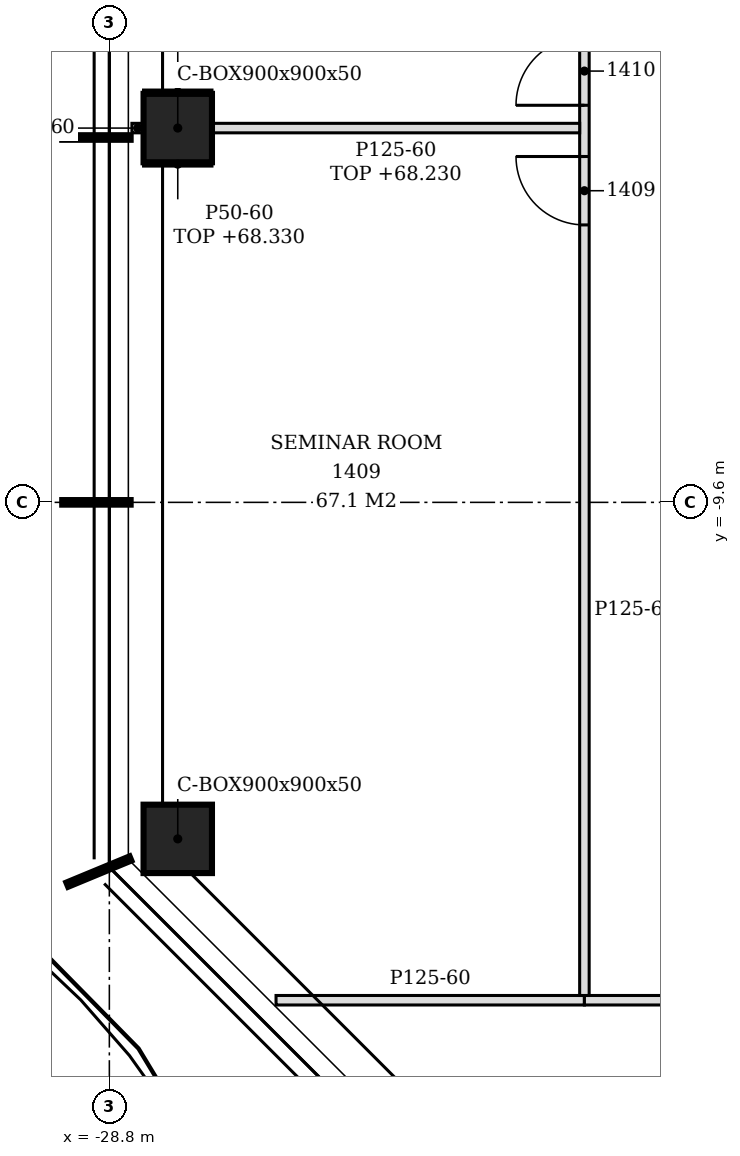
"""IFC4 building model, lengths in metres.
Left out: names, types, materials, properties, quantities, classifications, styles, units other than length and angle.
Written with IfcOpenShell. Run it as: python <this file> out.ifc"""

import sys

from ifc_helpers import new_model, si_unit, direction, frame, frame_2d, origin, origin_2d, place, context, subcontext, project, spatial, polyline, rectangle, hollow_rectangle, outline, extrude, element, fill, save


model = new_model("IFC4")
c1 = context("Model", 3, precision=1e-05, world=origin(), true_north=direction((0.0, 1.0)))
c2 = subcontext(c1, "Body", "Model", "MODEL_VIEW")
j1 = project(units=[si_unit("LENGTHUNIT", "METRE"), si_unit("PLANEANGLEUNIT", "RADIAN")], contexts=[c1])
p1 = place(None, origin())
s1 = spatial("IfcSite", under=j1, at=p1, CompositionType="ELEMENT")
p2 = place(p1, origin())
s2 = spatial("IfcBuilding", under=s1, at=p2, CompositionType="ELEMENT")
p3 = place(p2, frame((0.0, 0.0, 65.4)))
s3 = spatial("IfcBuildingStorey", under=s2, at=p3, CompositionType="ELEMENT", Elevation=65.4)
for number, where, z_axis, x_axis in (
    (1, (-27.9, -4.676, -0.15), (0.0, 0.0, 1.0), (1.0, 0.0, 0.0)),
    (2, (-27.9, -14.027, -0.15), (0.0, 0.0, 1.0), (1.0, 0.0, 0.0)),
):
    element("IfcColumn", number, at=place(p3, frame(where, z_axis=z_axis, x_axis=x_axis)), inside=s3, PredefinedType="COLUMN", context=c2, shape_type="SweptSolid", body=[
        extrude(hollow_rectangle(XDim=0.9, YDim=0.9, WallThickness=0.05, at=origin_2d()), origin(), (0.0, 0.0, 1.0), 3.6),
    ])
p4 = place(p3, frame((-26.607, -16.15, 0.0), z_axis=(0.0, 0.0, 1.0), x_axis=(1.0, 0.0, 0.0)))
e3 = element("IfcWall", 3, at=p4, inside=s3, PredefinedType="PARTITIONING", context=c2, shape_type="SweptSolid", body=[
    extrude(outline(polyline([(0.0, 0.0), (4.057, 0.0), (4.057, 3.45), (1.104, 3.45), (1.102, 2.93), (0.555, 2.93), (0.553, 3.45), (0.0, 3.45), (0.0, 0.0)])), frame((0.0, 0.062, 0.0), z_axis=(0.0, -1.0, 0.0), x_axis=(1.0, 0.0, 0.0)), (0.0, 0.0, 1.0), 0.125),
])
p5 = place(p3, frame((-22.55, -16.15, 0.0), z_axis=(0.0, 0.0, 1.0), x_axis=(1.0, 0.0, 0.0)))
e4 = element("IfcWall", 4, at=p5, inside=s3, PredefinedType="PARTITIONING", context=c2, shape_type="SweptSolid", body=[
    extrude(outline(polyline([(0.0, 0.0), (41.688, 0.0), (41.688, 2.73), (41.6, 2.73), (41.598, 3.45), (29.9, 3.45), (29.898, 2.73), (29.6, 2.73), (29.598, 3.45), (17.9, 3.45), (17.898, 2.73), (17.6, 2.73), (17.598, 3.45), (8.3, 3.45), (8.298, 2.93), (8.0, 2.93), (7.998, 3.45), (0.0, 3.45), (0.0, 0.0)])), frame((0.0, 0.062, 0.0), z_axis=(0.0, -1.0, 0.0), x_axis=(1.0, 0.0, 0.0)), (0.0, 0.0, 1.0), 0.125),
])
p6 = place(p5, frame((6.95, 0.0, 0.0)))
e5 = element("IfcOpeningElement", 5, at=p6, cuts=e4, PredefinedType="OPENING", context=c2, shape_type="SweptSolid", body=[
    extrude(rectangle(XDim=0.9, YDim=2.1, at=frame_2d((0.45, 1.05))), frame((0.0, 0.073, 0.0), z_axis=(0.0, -1.0, 0.0), x_axis=(1.0, 0.0, 0.0)), (0.0, 0.0, 1.0), 0.145),
])
p7 = place(p5, frame((11.936, 0.0, 0.0)))
e6 = element("IfcOpeningElement", 6, at=p7, cuts=e4, PredefinedType="OPENING", context=c2, shape_type="SweptSolid", body=[
    extrude(rectangle(XDim=0.9, YDim=2.1, at=frame_2d((0.45, 1.05))), frame((0.0, 0.073, 0.0), z_axis=(0.0, -1.0, 0.0), x_axis=(1.0, 0.0, 0.0)), (0.0, 0.0, 1.0), 0.145),
])
p8 = place(p5, frame((16.55, 0.0, 0.0)))
e7 = element("IfcOpeningElement", 7, at=p8, cuts=e4, PredefinedType="OPENING", context=c2, shape_type="SweptSolid", body=[
    extrude(rectangle(XDim=0.9, YDim=2.1, at=frame_2d((0.45, 1.05))), frame((0.0, 0.073, 0.0), z_axis=(0.0, -1.0, 0.0), x_axis=(1.0, 0.0, 0.0)), (0.0, 0.0, 1.0), 0.145),
])
p9 = place(p5, frame((21.35, 0.0, 0.0)))
e8 = element("IfcOpeningElement", 8, at=p9, cuts=e4, PredefinedType="OPENING", context=c2, shape_type="SweptSolid", body=[
    extrude(rectangle(XDim=0.9, YDim=2.1, at=frame_2d((0.45, 1.05))), frame((0.0, 0.073, 0.0), z_axis=(0.0, -1.0, 0.0), x_axis=(1.0, 0.0, 0.0)), (0.0, 0.0, 1.0), 0.145),
])
p10 = place(p5, frame((26.15, 0.0, 0.0)))
e9 = element("IfcOpeningElement", 9, at=p10, cuts=e4, PredefinedType="OPENING", context=c2, shape_type="SweptSolid", body=[
    extrude(rectangle(XDim=0.9, YDim=2.1, at=frame_2d((0.45, 1.05))), frame((0.0, 0.073, 0.0), z_axis=(0.0, -1.0, 0.0), x_axis=(1.0, 0.0, 0.0)), (0.0, 0.0, 1.0), 0.145),
])
p11 = place(p5, frame((30.764, 0.0, 0.0)))
e10 = element("IfcOpeningElement", 10, at=p11, cuts=e4, PredefinedType="OPENING", context=c2, shape_type="SweptSolid", body=[
    extrude(rectangle(XDim=0.9, YDim=2.1, at=frame_2d((0.45, 1.05))), frame((0.0, 0.073, 0.0), z_axis=(0.0, -1.0, 0.0), x_axis=(1.0, 0.0, 0.0)), (0.0, 0.0, 1.0), 0.145),
])
p12 = place(p5, frame((32.35, 0.0, 0.0)))
e11 = element("IfcOpeningElement", 11, at=p12, cuts=e4, PredefinedType="OPENING", context=c2, shape_type="SweptSolid", body=[
    extrude(rectangle(XDim=0.9, YDim=2.1, at=frame_2d((0.45, 1.05))), frame((0.0, 0.073, 0.0), z_axis=(0.0, -1.0, 0.0), x_axis=(1.0, 0.0, 0.0)), (0.0, 0.0, 1.0), 0.145),
])
p13 = place(p5, frame((37.25, 0.0, 0.0)))
e12 = element("IfcOpeningElement", 12, at=p13, cuts=e4, PredefinedType="OPENING", context=c2, shape_type="SweptSolid", body=[
    extrude(rectangle(XDim=0.9, YDim=2.1, at=frame_2d((0.45, 1.05))), frame((0.0, 0.073, 0.0), z_axis=(0.0, -1.0, 0.0), x_axis=(1.0, 0.0, 0.0)), (0.0, 0.0, 1.0), 0.145),
])
p14 = place(p3, frame((-22.55, -16.087, 0.0), z_axis=(0.0, 0.0, 1.0), x_axis=(0.0, 1.0, 0.0)))
e13 = element("IfcWall", 13, at=p14, inside=s3, PredefinedType="PARTITIONING", context=c2, shape_type="SweptSolid", body=[
    extrude(outline(polyline([(0.0, 0.0), (36.276, 0.0), (36.276, 3.45), (36.022, 3.45), (36.02, 2.63), (34.907, 2.63), (34.905, 3.45), (30.597, 3.45), (30.595, 2.83), (30.377, 2.83), (30.375, 3.45), (25.798, 3.45), (25.795, 2.83), (25.577, 2.83), (25.575, 3.45), (20.998, 3.45), (20.996, 2.83), (20.778, 2.83), (20.775, 3.45), (16.198, 3.45), (16.196, 2.83), (15.978, 2.83), (15.976, 3.45), (11.397, 3.45), (11.396, 2.83), (11.177, 2.83), (11.176, 3.45), (6.597, 3.45), (6.595, 2.83), (6.377, 2.83), (6.375, 3.45), (1.798, 3.45), (1.795, 2.83), (1.577, 2.83), (1.575, 3.45), (0.0, 3.45), (0.0, 0.0)])), frame((0.0, 0.062, 0.0), z_axis=(0.0, -1.0, 0.0), x_axis=(1.0, 0.0, 0.0)), (0.0, 0.0, 1.0), 0.125),
])
p15 = place(p14, frame((10.137, 0.0, 0.0)))
e14 = element("IfcOpeningElement", 14, at=p15, cuts=e13, PredefinedType="OPENING", context=c2, shape_type="SweptSolid", body=[
    extrude(rectangle(XDim=0.9, YDim=2.1, at=frame_2d((0.45, 1.05))), frame((0.0, 0.073, 0.0), z_axis=(0.0, -1.0, 0.0), x_axis=(1.0, 0.0, 0.0)), (0.0, 0.0, 1.0), 0.145),
])
p16 = place(p14, frame((11.711, 0.0, 0.0)))
e15 = element("IfcOpeningElement", 15, at=p16, cuts=e13, PredefinedType="OPENING", context=c2, shape_type="SweptSolid", body=[
    extrude(rectangle(XDim=0.9, YDim=2.1, at=frame_2d((0.45, 1.05))), frame((0.0, 0.073, 0.0), z_axis=(0.0, -1.0, 0.0), x_axis=(1.0, 0.0, 0.0)), (0.0, 0.0, 1.0), 0.145),
])
p17 = place(p14, frame((17.288, 0.0, 0.0)))
e16 = element("IfcOpeningElement", 16, at=p17, cuts=e13, PredefinedType="OPENING", context=c2, shape_type="SweptSolid", body=[
    extrude(rectangle(XDim=0.9, YDim=2.1, at=frame_2d((0.45, 1.05))), frame((0.0, 0.073, 0.0), z_axis=(0.0, -1.0, 0.0), x_axis=(1.0, 0.0, 0.0)), (0.0, 0.0, 1.0), 0.145),
])
p18 = place(p14, frame((21.063, 0.0, 0.0)))
e17 = element("IfcOpeningElement", 17, at=p18, cuts=e13, PredefinedType="OPENING", context=c2, shape_type="SweptSolid", body=[
    extrude(rectangle(XDim=0.9, YDim=2.1, at=frame_2d((0.45, 1.05))), frame((0.0, 0.073, 0.0), z_axis=(0.0, -1.0, 0.0), x_axis=(1.0, 0.0, 0.0)), (0.0, 0.0, 1.0), 0.145),
])
p19 = place(p14, frame((27.188, 0.0, 0.0)))
e18 = element("IfcOpeningElement", 18, at=p19, cuts=e13, PredefinedType="OPENING", context=c2, shape_type="SweptSolid", body=[
    extrude(rectangle(XDim=0.9, YDim=2.1, at=frame_2d((0.45, 1.05))), frame((0.0, 0.073, 0.0), z_axis=(0.0, -1.0, 0.0), x_axis=(1.0, 0.0, 0.0)), (0.0, 0.0, 1.0), 0.145),
])
p20 = place(p14, frame((30.415, 0.0, 0.0)))
e19 = element("IfcOpeningElement", 19, at=p20, cuts=e13, PredefinedType="OPENING", context=c2, shape_type="SweptSolid", body=[
    extrude(rectangle(XDim=0.9, YDim=2.1, at=frame_2d((0.45, 1.05))), frame((0.0, 0.073, 0.0), z_axis=(0.0, -1.0, 0.0), x_axis=(1.0, 0.0, 0.0)), (0.0, 0.0, 1.0), 0.145),
])
p21 = place(p3, frame((-28.503, -4.676, 0.0), z_axis=(0.0, 0.0, 1.0), x_axis=(1.0, 0.0, 0.0)))
e20 = element("IfcWall", 20, at=p21, inside=s3, PredefinedType="PARTITIONING", context=c2, shape_type="SweptSolid", body=[
    extrude(rectangle(XDim=0.153, YDim=0.125, at=frame_2d((0.076, 0.0))), origin(), (0.0, 0.0, 1.0), 3.45),
])
p22 = place(p3, frame((-27.45, -4.676, 0.0), z_axis=(0.0, 0.0, 1.0), x_axis=(1.0, 0.0, 0.0)))
e21 = element("IfcWall", 21, at=p22, inside=s3, PredefinedType="PARTITIONING", context=c2, shape_type="SweptSolid", body=[
    extrude(rectangle(XDim=4.837, YDim=0.125, at=frame_2d((2.419, 0.0))), origin(), (0.0, 0.0, 1.0), 2.83),
])
for number, where, z_axis, x_axis in (
    (22, (-28.35, -4.201, 0.0), (0.0, 0.0, 1.0), (1.0, 0.0, 0.0)),
    (23, (-28.35, -5.151, 0.0), (0.0, 0.0, 1.0), (1.0, 0.0, 0.0)),
):
    element("IfcWall", number, at=place(p3, frame(where, z_axis=z_axis, x_axis=x_axis)), inside=s3, PredefinedType="PARTITIONING", context=c2, shape_type="SweptSolid", body=[
        extrude(rectangle(XDim=0.9, YDim=0.05, at=frame_2d((0.45, 0.0))), origin(), (0.0, 0.0, 1.0), 2.93),
    ])
p23 = place(p15, origin())
e24 = element("IfcDoor", 24, at=p23, inside=s3, OperationType="SINGLE_SWING_RIGHT", PredefinedType="DOOR", context=c2, shape_type="SweptSolid", body=[
    extrude(rectangle(XDim=0.9, YDim=2.1, at=frame_2d((0.45, 1.05))), frame((0.0, 0.025, 0.0), z_axis=(0.0, -1.0, 0.0), x_axis=(1.0, 0.0, 0.0)), (0.0, 0.0, 1.0), 0.05),
])
fill(e14, e24)
p24 = place(p16, origin())
e25 = element("IfcDoor", 25, at=p24, inside=s3, OperationType="SINGLE_SWING_LEFT", PredefinedType="DOOR", context=c2, shape_type="SweptSolid", body=[
    extrude(rectangle(XDim=0.9, YDim=2.1, at=frame_2d((0.45, 1.05))), frame((0.0, 0.025, 0.0), z_axis=(0.0, -1.0, 0.0), x_axis=(1.0, 0.0, 0.0)), (0.0, 0.0, 1.0), 0.05),
])
fill(e15, e25)
save(model, sys.argv[1])
